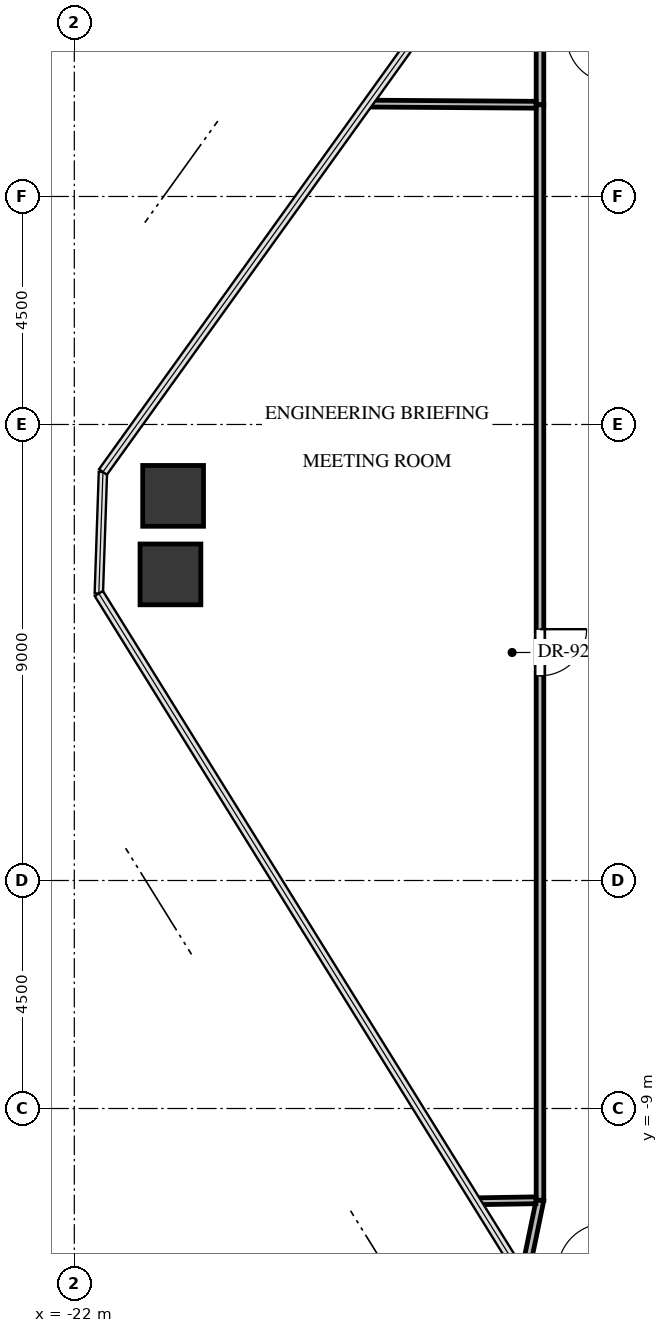
"""IFC4 building model, lengths in metres.
Left out: names, types, materials, properties, quantities, classifications, styles, units other than length and angle.
Written with IfcOpenShell. Run it as: python <this file> out.ifc"""

import sys

from ifc_helpers import new_model, si_unit, direction, frame, frame_2d, origin, origin_2d, place, context, subcontext, project, spatial, rectangle, extrude, source, transform, mapped, element, fill, save


model = new_model("IFC4")
c1 = context("Model", 3, precision=1e-05, world=origin(), true_north=direction((0.0, 1.0)))
c2 = subcontext(c1, "Body", "Model", "MODEL_VIEW")
j1 = project(units=[si_unit("LENGTHUNIT", "METRE"), si_unit("PLANEANGLEUNIT", "RADIAN")], contexts=[c1])
p1 = place(None, origin())
s1 = spatial("IfcSite", under=j1, at=p1, CompositionType="ELEMENT")
p2 = place(p1, origin())
s2 = spatial("IfcBuilding", under=s1, at=p2, CompositionType="ELEMENT")
p3 = place(p2, frame((0.0, 0.0, 100.8)))
s3 = spatial("IfcBuildingStorey", under=s2, at=p3, CompositionType="ELEMENT", Elevation=100.8)
m1 = source(origin(), c2, "Body", "SweptSolid", [
    extrude(rectangle(XDim=1.2, YDim=1.2, at=origin_2d()), origin(), (0.0, 0.0, 1.0), 3.3),
])
for number, where, z_axis, x_axis in (
    (1, (-20.103, 1.542, -0.24), (0.0, 0.0, 1.0), (1.0, 0.0, 0.0)),
    (2, (-20.05, 3.091, -0.24), (0.0, 0.0, 1.0), (1.0, 0.0, 0.0)),
):
    element("IfcColumn", number, at=place(p3, frame(where, z_axis=z_axis, x_axis=x_axis)), inside=s3, PredefinedType="COLUMN", context=c2, shape_type="MappedRepresentation", body=[
        mapped(m1, transform((0.0, 0.0, 0.0), x_axis=(1.0, 0.0, 0.0), y_axis=(0.0, 1.0, 0.0), z_axis=(0.0, 0.0, 1.0), scale=1.0)),
    ])
p4 = place(p3, frame((-12.81, 12.081, 0.0), z_axis=(0.0, 0.0, 1.0), x_axis=(0.0, -1.0, 0.0)))
e3 = element("IfcWall", 3, at=p4, inside=s3, PredefinedType="PARTITIONING", context=c2, shape_type="SweptSolid", body=[
    extrude(rectangle(XDim=1.271, YDim=0.15, at=frame_2d((0.635, 0.0))), origin(), (0.0, 0.0, 1.0), 3.045),
])
p5 = place(p3, frame((-12.81, -10.81, 0.0), z_axis=(0.0, 0.0, 1.0), x_axis=(-0.201786289638, -0.979429575474, 0.0)))
e4 = element("IfcWall", 4, at=p5, inside=s3, PredefinedType="PARTITIONING", context=c2, shape_type="SweptSolid", body=[
    extrude(rectangle(XDim=1.498, YDim=0.15, at=frame_2d((0.749, 0.0))), origin(), (0.0, 0.0, 1.0), 3.045),
])
p6 = place(p3, frame((-12.81, 10.81, 0.0), z_axis=(0.0, 0.0, 1.0), x_axis=(0.0, -1.0, 0.0)))
e5 = element("IfcWall", 5, at=p6, inside=s3, PredefinedType="PARTITIONING", context=c2, shape_type="SweptSolid", body=[
    extrude(rectangle(XDim=21.62, YDim=0.15, at=frame_2d((10.81, 0.0))), origin(), (0.0, 0.0, 1.0), 2.212),
])
p7 = place(p6, frame((10.35, 0.0, 0.0)))
e6 = element("IfcOpeningElement", 6, at=p7, cuts=e5, PredefinedType="OPENING", context=c2, shape_type="SweptSolid", body=[
    extrude(rectangle(XDim=0.92, YDim=2.1, at=frame_2d((0.46, 1.05))), frame((0.0, 0.085, 0.0), z_axis=(0.0, -1.0, 0.0), x_axis=(1.0, 0.0, 0.0)), (0.0, 0.0, 1.0), 0.17),
])
p8 = place(p3, frame((-12.889, 10.811, 0.0), z_axis=(0.0, 0.0, 1.0), x_axis=(-0.999976657862, 0.006832549348, 0.0)))
e7 = element("IfcWall", 7, at=p8, inside=s3, PredefinedType="PARTITIONING", context=c2, shape_type="SweptSolid", body=[
    extrude(rectangle(XDim=3.323, YDim=0.135, at=frame_2d((1.662, 0.0))), origin(), (0.0, 0.0, 1.0), 2.38),
])
p9 = place(p3, frame((-14.076, -10.831, 0.0), z_axis=(0.0, 0.0, 1.0), x_axis=(0.999860796611, 0.016684945308, 0.0)))
e8 = element("IfcWall", 8, at=p9, inside=s3, PredefinedType="PARTITIONING", context=c2, shape_type="SweptSolid", body=[
    extrude(rectangle(XDim=1.185, YDim=0.135, at=frame_2d((0.593, 0.0))), origin(), (0.0, 0.0, 1.0), 3.045),
])
m2 = source(origin(), c2, "Body", "SweptSolid", [
    extrude(rectangle(XDim=0.92, YDim=2.1, at=frame_2d((0.46, 1.05))), frame((0.0, 0.025, 0.0), z_axis=(0.0, -1.0, 0.0), x_axis=(1.0, 0.0, 0.0)), (0.0, 0.0, 1.0), 0.05),
])
p10 = place(p7, origin())
e9 = element("IfcDoor", 9, at=p10, inside=s3, OperationType="SINGLE_SWING_LEFT", PredefinedType="DOOR", context=c2, shape_type="MappedRepresentation", body=[
    mapped(m2, transform((0.0, 0.0, 0.0), x_axis=(1.0, 0.0, 0.0), y_axis=(0.0, 1.0, 0.0), z_axis=(0.0, 0.0, 1.0), scale=1.0)),
])
fill(e6, e9)
save(model, sys.argv[1])
